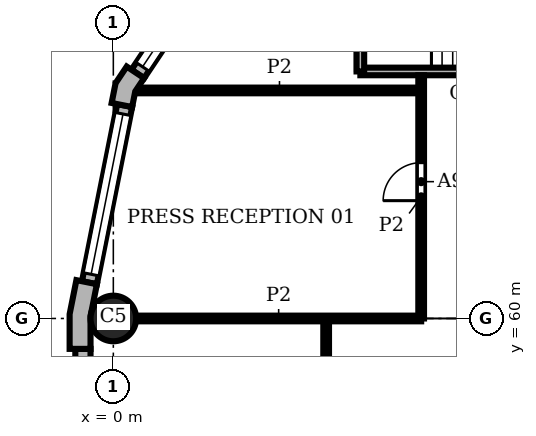
"""IFC4 building model, lengths in metres.
Left out: names, types, materials, properties, quantities, classifications, styles, units other than length and angle.
Written with IfcOpenShell. Run it as: python <this file> out.ifc"""

import sys

from ifc_helpers import new_model, si_unit, direction, frame, frame_2d, origin, origin_2d, place, context, subcontext, project, spatial, polyline, rectangle, circle, outline, extrude, element, fill, save


model = new_model("IFC4")
c1 = context("Model", 3, precision=1e-05, world=origin(), true_north=direction((0.0, 1.0)))
c2 = subcontext(c1, "Body", "Model", "MODEL_VIEW")
j1 = project(units=[si_unit("LENGTHUNIT", "METRE"), si_unit("PLANEANGLEUNIT", "RADIAN")], contexts=[c1])
p1 = place(None, origin())
s1 = spatial("IfcSite", under=j1, at=p1, CompositionType="ELEMENT")
p2 = place(p1, origin())
s2 = spatial("IfcBuilding", under=s1, at=p2, CompositionType="ELEMENT")
p3 = place(p2, frame((0.0, 0.0, 113.4)))
s3 = spatial("IfcBuildingStorey", under=s2, at=p3, CompositionType="ELEMENT", Elevation=113.4)
p4 = place(p3, frame((0.0, 60.0, 0.0), z_axis=(0.0, 0.0, 1.0), x_axis=(1.0, 0.0, 0.0)))
e1 = element("IfcColumn", 1, at=p4, inside=s3, PredefinedType="COLUMN", context=c2, shape_type="SweptSolid", body=[
    extrude(circle(Radius=0.6, at=origin_2d()), origin(), (0.0, 0.0, 1.0), 3.9),
])
p5 = place(p3, origin())
e2 = element("IfcWall", 2, at=p5, inside=s3, PredefinedType="SOLIDWALL", context=c2, shape_type="SweptSolid", body=[
    extrude(outline(polyline([(0.477, 66.545), (0.352, 66.629), (0.059, 66.189), (-0.045, 65.67), (0.103, 65.641), (0.495, 65.563), (0.577, 65.974), (0.81, 66.323), (0.477, 66.545)])), origin(), (0.0, 0.0, 1.0), 3.9),
])
e3 = element("IfcWall", 3, at=p5, inside=s3, PredefinedType="SOLIDWALL", context=c2, shape_type="SweptSolid", body=[
    extrude(outline(polyline([(-0.825, 60.98), (-0.972, 61.009), (-1.15, 60.113), (-1.15, 59.2), (-1.0, 59.2), (-0.6, 59.2), (-0.6, 60.059), (-0.432, 60.902), (-0.825, 60.98)])), origin(), (0.0, 0.0, 1.0), 3.9),
])
p6 = place(p3, frame((3.284, 70.386, 0.0), z_axis=(0.0, 0.0, 1.0), x_axis=(-0.555541552266, -0.831488775454, 0.0)))
e4 = element("IfcWall", 4, at=p6, inside=s3, PredefinedType="SOLIDWALL", context=c2, shape_type="SweptSolid", body=[
    extrude(rectangle(XDim=4.753, YDim=0.4, at=frame_2d((2.376, 0.0))), origin(), (0.0, 0.0, 1.0), 3.9),
])
p7 = place(p6, frame((0.226, 0.0, 0.9)))
e5 = element("IfcOpeningElement", 5, at=p7, cuts=e4, PredefinedType="OPENING", context=c2, shape_type="SweptSolid", body=[
    extrude(rectangle(XDim=4.3, YDim=2.35, at=frame_2d((2.15, 1.175))), frame((0.0, 0.21, 0.0), z_axis=(0.0, -1.0, 0.0), x_axis=(1.0, 0.0, 0.0)), (0.0, 0.0, 1.0), 0.42),
])
p8 = place(p3, frame((0.299, 65.602, 0.0), z_axis=(0.0, 0.0, 1.0), x_axis=(-0.195098533057, -0.98078364709, 0.0)))
e6 = element("IfcWall", 6, at=p8, inside=s3, PredefinedType="SOLIDWALL", context=c2, shape_type="SweptSolid", body=[
    extrude(rectangle(XDim=4.753, YDim=0.4, at=frame_2d((2.376, 0.0))), origin(), (0.0, 0.0, 1.0), 3.9),
])
p9 = place(p8, frame((0.226, 0.0, 0.9)))
e7 = element("IfcOpeningElement", 7, at=p9, cuts=e6, PredefinedType="OPENING", context=c2, shape_type="SweptSolid", body=[
    extrude(rectangle(XDim=4.3, YDim=2.35, at=frame_2d((2.15, 1.175))), frame((0.0, 0.21, 0.0), z_axis=(0.0, -1.0, 0.0), x_axis=(1.0, 0.0, 0.0)), (0.0, 0.0, 1.0), 0.42),
])
p10 = place(p3, frame((-0.8, 59.2, 0.0), z_axis=(0.0, 0.0, 1.0), x_axis=(0.0, -1.0, 0.0)))
e8 = element("IfcWall", 8, at=p10, inside=s3, PredefinedType="SOLIDWALL", context=c2, shape_type="SweptSolid", body=[
    extrude(rectangle(XDim=18.4, YDim=0.4, at=frame_2d((9.2, 0.0))), origin(), (0.0, 0.0, 1.0), 3.9),
])
p11 = place(p10, frame((3.75, 0.0, 0.9)))
e9 = element("IfcOpeningElement", 9, at=p11, cuts=e8, PredefinedType="OPENING", context=c2, shape_type="SweptSolid", body=[
    extrude(rectangle(XDim=0.9, YDim=2.35, at=frame_2d((0.45, 1.175))), frame((0.0, 0.21, 0.0), z_axis=(0.0, -1.0, 0.0), x_axis=(1.0, 0.0, 0.0)), (0.0, 0.0, 1.0), 0.42),
])
p12 = place(p10, frame((13.75, 0.0, 0.9)))
e10 = element("IfcOpeningElement", 10, at=p12, cuts=e8, PredefinedType="OPENING", context=c2, shape_type="SweptSolid", body=[
    extrude(rectangle(XDim=0.9, YDim=2.35, at=frame_2d((0.45, 1.175))), frame((0.0, 0.21, 0.0), z_axis=(0.0, -1.0, 0.0), x_axis=(1.0, 0.0, 0.0)), (0.0, 0.0, 1.0), 0.42),
])
p13 = place(p3, frame((6.5, 66.5, 0.0), z_axis=(0.0, 0.0, 1.0), x_axis=(1.0, 0.0, 0.0)))
e11 = element("IfcWall", 11, at=p13, inside=s3, PredefinedType="SHEAR", context=c2, shape_type="SweptSolid", body=[
    extrude(rectangle(XDim=6.6, YDim=0.2, at=frame_2d((3.3, 0.0))), origin(), (0.0, 0.0, 1.0), 3.45),
])
p14 = place(p13, frame((5.225, 0.0, 0.0)))
e12 = element("IfcOpeningElement", 12, at=p14, cuts=e11, PredefinedType="OPENING", context=c2, shape_type="SweptSolid", body=[
    extrude(rectangle(XDim=1.0, YDim=2.1, at=frame_2d((0.5, 1.05))), frame((0.0, 0.11, 0.0), z_axis=(0.0, -1.0, 0.0), x_axis=(1.0, 0.0, 0.0)), (0.0, 0.0, 1.0), 0.22),
])
p15 = place(p3, frame((6.5, 66.5, 0.0), z_axis=(0.0, 0.0, 1.0), x_axis=(0.0, 1.0, 0.0)))
e13 = element("IfcWall", 13, at=p15, inside=s3, PredefinedType="SHEAR", context=c2, shape_type="SweptSolid", body=[
    extrude(rectangle(XDim=3.3, YDim=0.2, at=frame_2d((1.65, 0.0))), origin(), (0.0, 0.0, 1.0), 3.45),
])
p16 = place(p3, frame((5.6, 5.6, 0.0), z_axis=(0.0, 0.0, 1.0), x_axis=(0.0, 1.0, 0.0)))
e14 = element("IfcWall", 14, at=p16, inside=s3, PredefinedType="PARTITIONING", context=c2, shape_type="SweptSolid", body=[
    extrude(rectangle(XDim=54.4, YDim=0.15, at=frame_2d((27.2, 0.0))), origin(), (0.0, 0.0, 1.0), 3.45),
])
p17 = place(p16, frame((35.8, 0.0, 0.0)))
e15 = element("IfcOpeningElement", 15, at=p17, cuts=e14, PredefinedType="OPENING", context=c2, shape_type="SweptSolid", body=[
    extrude(rectangle(XDim=1.8, YDim=2.1, at=frame_2d((0.9, 1.05))), frame((0.0, 0.085, 0.0), z_axis=(0.0, -1.0, 0.0), x_axis=(1.0, 0.0, 0.0)), (0.0, 0.0, 1.0), 0.17),
])
p18 = place(p3, frame((8.1, 60.0, 0.0), z_axis=(0.0, 0.0, 1.0), x_axis=(0.0, 1.0, 0.0)))
e16 = element("IfcWall", 16, at=p18, inside=s3, PredefinedType="PARTITIONING", context=c2, shape_type="SweptSolid", body=[
    extrude(rectangle(XDim=6.4, YDim=0.15, at=frame_2d((3.2, 0.0))), origin(), (0.0, 0.0, 1.0), 3.45),
])
p19 = place(p18, frame((3.1, 0.0, 0.0)))
e17 = element("IfcOpeningElement", 17, at=p19, cuts=e16, PredefinedType="OPENING", context=c2, shape_type="SweptSolid", body=[
    extrude(rectangle(XDim=1.0, YDim=2.1, at=frame_2d((0.5, 1.05))), frame((0.0, 0.085, 0.0), z_axis=(0.0, -1.0, 0.0), x_axis=(1.0, 0.0, 0.0)), (0.0, 0.0, 1.0), 0.17),
])
p20 = place(p3, frame((0.6, 60.0, 0.0), z_axis=(0.0, 0.0, 1.0), x_axis=(1.0, 0.0, 0.0)))
e18 = element("IfcWall", 18, at=p20, inside=s3, PredefinedType="PARTITIONING", context=c2, shape_type="SweptSolid", body=[
    extrude(rectangle(XDim=7.5, YDim=0.15, at=frame_2d((3.75, 0.0))), origin(), (0.0, 0.0, 1.0), 3.45),
])
p21 = place(p3, frame((0.644, 66.0, 0.0), z_axis=(0.0, 0.0, 1.0), x_axis=(1.0, 0.0, 0.0)))
e19 = element("IfcWall", 19, at=p21, inside=s3, PredefinedType="PARTITIONING", context=c2, shape_type="SweptSolid", body=[
    extrude(rectangle(XDim=7.456, YDim=0.15, at=frame_2d((3.728, 0.0))), origin(), (0.0, 0.0, 1.0), 3.45),
])
p22 = place(p7, origin())
e20 = element("IfcWindow", 20, at=p22, inside=s3, PartitioningType="SINGLE_PANEL", PredefinedType="WINDOW", context=c2, shape_type="SweptSolid", body=[
    extrude(rectangle(XDim=4.3, YDim=2.35, at=frame_2d((2.15, 1.175))), frame((0.0, 0.16, 0.0), z_axis=(0.0, -1.0, 0.0), x_axis=(1.0, 0.0, 0.0)), (0.0, 0.0, 1.0), 0.06),
])
fill(e5, e20)
p23 = place(p9, origin())
e21 = element("IfcWindow", 21, at=p23, inside=s3, PartitioningType="SINGLE_PANEL", PredefinedType="WINDOW", context=c2, shape_type="SweptSolid", body=[
    extrude(rectangle(XDim=4.3, YDim=2.35, at=frame_2d((2.15, 1.175))), frame((0.0, 0.16, 0.0), z_axis=(0.0, -1.0, 0.0), x_axis=(1.0, 0.0, 0.0)), (0.0, 0.0, 1.0), 0.06),
])
fill(e7, e21)
p24 = place(p19, origin())
e22 = element("IfcDoor", 22, at=p24, inside=s3, OperationType="SINGLE_SWING_LEFT", PredefinedType="DOOR", context=c2, shape_type="SweptSolid", body=[
    extrude(rectangle(XDim=1.0, YDim=2.1, at=frame_2d((0.5, 1.05))), frame((0.0, 0.025, 0.0), z_axis=(0.0, -1.0, 0.0), x_axis=(1.0, 0.0, 0.0)), (0.0, 0.0, 1.0), 0.05),
])
fill(e17, e22)
save(model, sys.argv[1])
